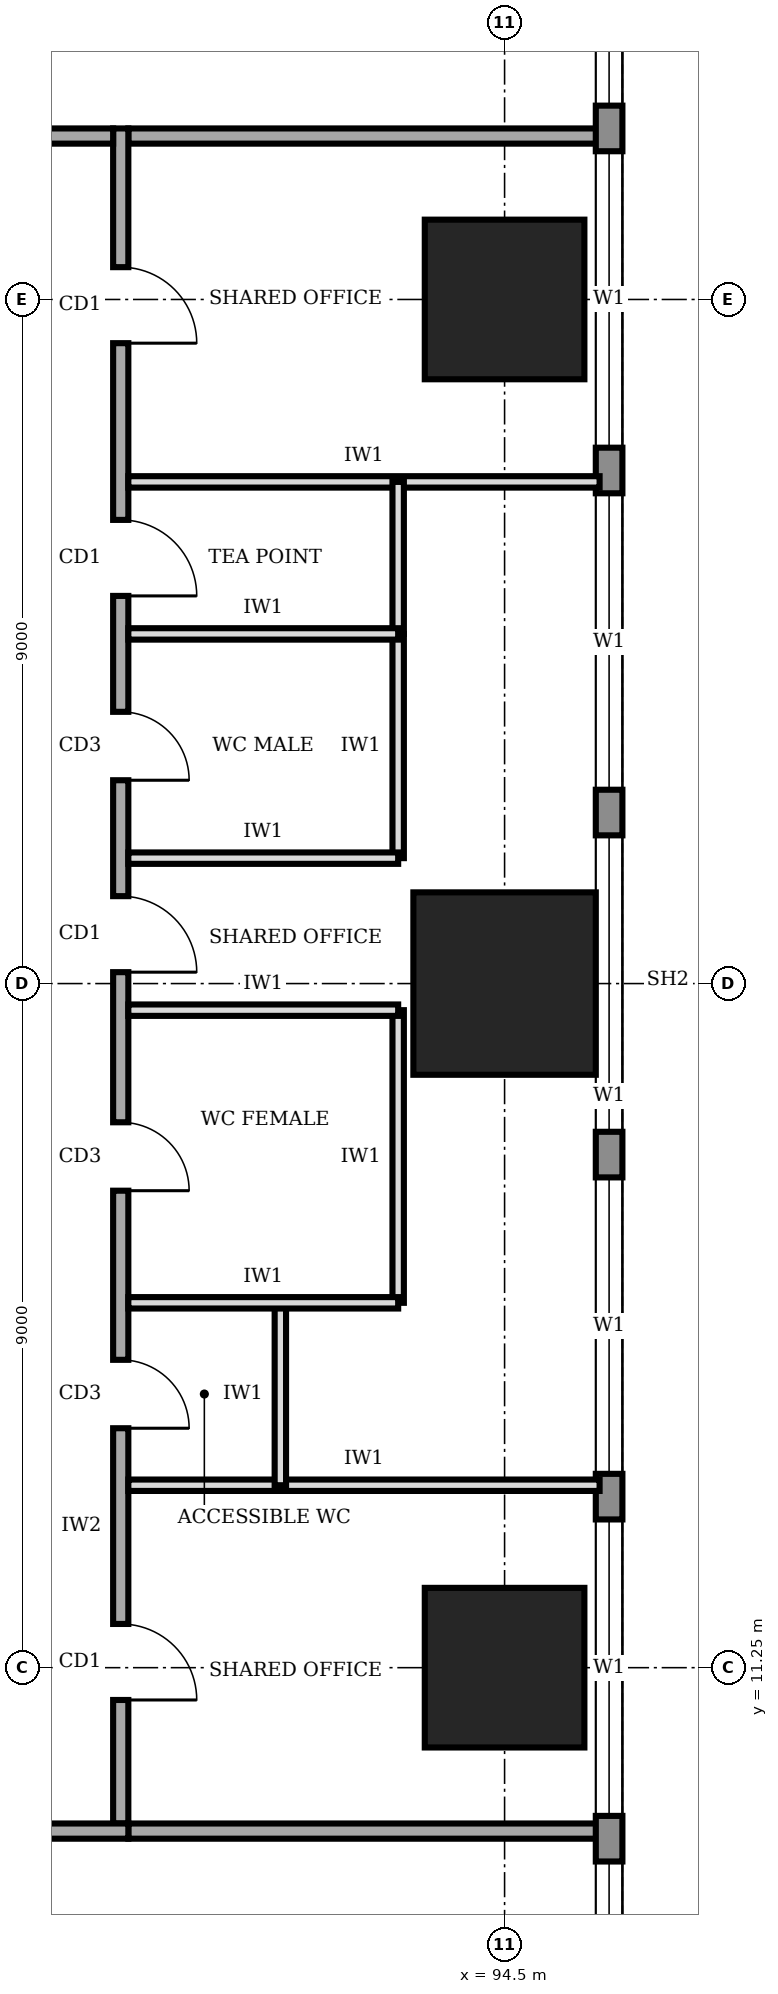
"""IFC4 building model, lengths in metres.
Left out: names, types, materials, properties, quantities, classifications, styles, units other than length and angle.
Written with IfcOpenShell. Run it as: python <this file> out.ifc"""

import sys

from ifc_helpers import new_model, si_unit, direction, frame, frame_2d, origin, origin_2d, place, context, subcontext, project, spatial, rectangle, extrude, element, fill, save


model = new_model("IFC4")
c1 = context("Model", 3, precision=1e-05, world=origin(), true_north=direction((0.0, 1.0)))
c2 = subcontext(c1, "Body", "Model", "MODEL_VIEW")
j1 = project(units=[si_unit("LENGTHUNIT", "METRE"), si_unit("PLANEANGLEUNIT", "RADIAN")], contexts=[c1])
p1 = place(None, origin())
s1 = spatial("IfcSite", under=j1, at=p1, CompositionType="ELEMENT")
p2 = place(p1, origin())
s2 = spatial("IfcBuilding", under=s1, at=p2, CompositionType="ELEMENT")
p3 = place(p2, frame((0.0, 0.0, 133.0)))
s3 = spatial("IfcBuildingStorey", under=s2, at=p3, CompositionType="ELEMENT", Elevation=133.0)
p4 = place(p3, frame((94.5, 11.25, 0.0), z_axis=(0.0, 0.0, 1.0), x_axis=(1.0, 0.0, 0.0)))
e1 = element("IfcColumn", 1, at=p4, inside=s3, PredefinedType="COLUMN", context=c2, shape_type="SweptSolid", body=[
    extrude(rectangle(XDim=2.1, YDim=2.1, at=origin_2d()), origin(), (0.0, 0.0, 1.0), 4.0),
])
p5 = place(p3, frame((94.5, 20.25, 0.0), z_axis=(0.0, 0.0, 1.0), x_axis=(1.0, 0.0, 0.0)))
e2 = element("IfcColumn", 2, at=p5, inside=s3, PredefinedType="COLUMN", context=c2, shape_type="SweptSolid", body=[
    extrude(rectangle(XDim=2.4, YDim=2.4, at=origin_2d()), origin(), (0.0, 0.0, 1.0), 4.0),
])
p6 = place(p3, frame((94.5, 29.25, 0.0), z_axis=(0.0, 0.0, 1.0), x_axis=(1.0, 0.0, 0.0)))
e3 = element("IfcColumn", 3, at=p6, inside=s3, PredefinedType="COLUMN", context=c2, shape_type="SweptSolid", body=[
    extrude(rectangle(XDim=2.1, YDim=2.1, at=origin_2d()), origin(), (0.0, 0.0, 1.0), 4.0),
])
p7 = place(p3, frame((95.875, 3.32, 0.0), z_axis=(0.0, 0.0, 1.0), x_axis=(0.0, 1.0, 0.0)))
e4 = element("IfcWall", 4, at=p7, inside=s3, PredefinedType="STANDARD", context=c2, shape_type="SweptSolid", body=[
    extrude(rectangle(XDim=33.96, YDim=0.35, at=frame_2d((16.98, 0.0))), origin(), (0.0, 0.0, 1.0), 3.75),
])
p8 = place(p7, frame((1.48, 0.0, 0.9)))
e5 = element("IfcOpeningElement", 5, at=p8, cuts=e4, PredefinedType="OPENING", context=c2, shape_type="SweptSolid", body=[
    extrude(rectangle(XDim=3.9, YDim=2.2, at=frame_2d((1.95, 1.1))), frame((0.0, 0.185, 0.0), z_axis=(0.0, -1.0, 0.0), x_axis=(1.0, 0.0, 0.0)), (0.0, 0.0, 1.0), 0.37),
])
p9 = place(p7, frame((5.98, 0.0, 0.9)))
e6 = element("IfcOpeningElement", 6, at=p9, cuts=e4, PredefinedType="OPENING", context=c2, shape_type="SweptSolid", body=[
    extrude(rectangle(XDim=3.9, YDim=2.2, at=frame_2d((1.95, 1.1))), frame((0.0, 0.185, 0.0), z_axis=(0.0, -1.0, 0.0), x_axis=(1.0, 0.0, 0.0)), (0.0, 0.0, 1.0), 0.37),
])
p10 = place(p7, frame((10.48, 0.0, 0.9)))
e7 = element("IfcOpeningElement", 7, at=p10, cuts=e4, PredefinedType="OPENING", context=c2, shape_type="SweptSolid", body=[
    extrude(rectangle(XDim=3.9, YDim=2.2, at=frame_2d((1.95, 1.1))), frame((0.0, 0.185, 0.0), z_axis=(0.0, -1.0, 0.0), x_axis=(1.0, 0.0, 0.0)), (0.0, 0.0, 1.0), 0.37),
])
p11 = place(p7, frame((14.98, 0.0, 0.9)))
e8 = element("IfcOpeningElement", 8, at=p11, cuts=e4, PredefinedType="OPENING", context=c2, shape_type="SweptSolid", body=[
    extrude(rectangle(XDim=3.9, YDim=2.2, at=frame_2d((1.95, 1.1))), frame((0.0, 0.185, 0.0), z_axis=(0.0, -1.0, 0.0), x_axis=(1.0, 0.0, 0.0)), (0.0, 0.0, 1.0), 0.37),
])
p12 = place(p7, frame((19.48, 0.0, 0.9)))
e9 = element("IfcOpeningElement", 9, at=p12, cuts=e4, PredefinedType="OPENING", context=c2, shape_type="SweptSolid", body=[
    extrude(rectangle(XDim=3.9, YDim=2.2, at=frame_2d((1.95, 1.1))), frame((0.0, 0.185, 0.0), z_axis=(0.0, -1.0, 0.0), x_axis=(1.0, 0.0, 0.0)), (0.0, 0.0, 1.0), 0.37),
])
p13 = place(p7, frame((23.98, 0.0, 0.9)))
e10 = element("IfcOpeningElement", 10, at=p13, cuts=e4, PredefinedType="OPENING", context=c2, shape_type="SweptSolid", body=[
    extrude(rectangle(XDim=3.9, YDim=2.2, at=frame_2d((1.95, 1.1))), frame((0.0, 0.185, 0.0), z_axis=(0.0, -1.0, 0.0), x_axis=(1.0, 0.0, 0.0)), (0.0, 0.0, 1.0), 0.37),
])
p14 = place(p7, frame((28.48, 0.0, 0.9)))
e11 = element("IfcOpeningElement", 11, at=p14, cuts=e4, PredefinedType="OPENING", context=c2, shape_type="SweptSolid", body=[
    extrude(rectangle(XDim=3.9, YDim=2.2, at=frame_2d((1.95, 1.1))), frame((0.0, 0.185, 0.0), z_axis=(0.0, -1.0, 0.0), x_axis=(1.0, 0.0, 0.0)), (0.0, 0.0, 1.0), 0.37),
])
p15 = place(p3, frame((72.65, 9.1, 0.0), z_axis=(0.0, 0.0, 1.0), x_axis=(1.0, 0.0, 0.0)))
e12 = element("IfcWall", 12, at=p15, inside=s3, PredefinedType="SOLIDWALL", context=c2, shape_type="SweptSolid", body=[
    extrude(rectangle(XDim=16.9, YDim=0.2, at=frame_2d((8.45, 0.0))), origin(), (0.0, 0.0, 1.0), 3.75),
])
p16 = place(p15, frame((1.325, 0.0, 0.0)))
e13 = element("IfcOpeningElement", 13, at=p16, cuts=e12, PredefinedType="OPENING", context=c2, shape_type="SweptSolid", body=[
    extrude(rectangle(XDim=1.0, YDim=2.1, at=frame_2d((0.5, 1.05))), frame((0.0, 0.11, 0.0), z_axis=(0.0, -1.0, 0.0), x_axis=(1.0, 0.0, 0.0)), (0.0, 0.0, 1.0), 0.22),
])
p17 = place(p15, frame((5.6, 0.0, 0.0)))
e14 = element("IfcOpeningElement", 14, at=p17, cuts=e12, PredefinedType="OPENING", context=c2, shape_type="SweptSolid", body=[
    extrude(rectangle(XDim=1.0, YDim=2.1, at=frame_2d((0.5, 1.05))), frame((0.0, 0.11, 0.0), z_axis=(0.0, -1.0, 0.0), x_axis=(1.0, 0.0, 0.0)), (0.0, 0.0, 1.0), 0.22),
])
p18 = place(p15, frame((12.125, 0.0, 0.0)))
e15 = element("IfcOpeningElement", 15, at=p18, cuts=e12, PredefinedType="OPENING", context=c2, shape_type="SweptSolid", body=[
    extrude(rectangle(XDim=1.0, YDim=2.1, at=frame_2d((0.5, 1.05))), frame((0.0, 0.11, 0.0), z_axis=(0.0, -1.0, 0.0), x_axis=(1.0, 0.0, 0.0)), (0.0, 0.0, 1.0), 0.22),
])
p19 = place(p3, frame((89.45, 9.2, 0.0), z_axis=(0.0, 0.0, 1.0), x_axis=(0.0, 1.0, 0.0)))
e16 = element("IfcWall", 16, at=p19, inside=s3, PredefinedType="SOLIDWALL", context=c2, shape_type="SweptSolid", body=[
    extrude(rectangle(XDim=22.3, YDim=0.2, at=frame_2d((11.15, 0.0))), origin(), (0.0, 0.0, 1.0), 3.75),
])
p20 = place(p19, frame((1.625, 0.0, 0.0)))
e17 = element("IfcOpeningElement", 17, at=p20, cuts=e16, PredefinedType="OPENING", context=c2, shape_type="SweptSolid", body=[
    extrude(rectangle(XDim=1.0, YDim=2.1, at=frame_2d((0.5, 1.05))), frame((0.0, 0.11, 0.0), z_axis=(0.0, -1.0, 0.0), x_axis=(1.0, 0.0, 0.0)), (0.0, 0.0, 1.0), 0.22),
])
p21 = place(p19, frame((5.2, 0.0, 0.0)))
e18 = element("IfcOpeningElement", 18, at=p21, cuts=e16, PredefinedType="OPENING", context=c2, shape_type="SweptSolid", body=[
    extrude(rectangle(XDim=0.9, YDim=2.1, at=frame_2d((0.45, 1.05))), frame((0.0, 0.11, 0.0), z_axis=(0.0, -1.0, 0.0), x_axis=(1.0, 0.0, 0.0)), (0.0, 0.0, 1.0), 0.22),
])
p22 = place(p19, frame((8.325, 0.0, 0.0)))
e19 = element("IfcOpeningElement", 19, at=p22, cuts=e16, PredefinedType="OPENING", context=c2, shape_type="SweptSolid", body=[
    extrude(rectangle(XDim=0.9, YDim=2.1, at=frame_2d((0.45, 1.05))), frame((0.0, 0.11, 0.0), z_axis=(0.0, -1.0, 0.0), x_axis=(1.0, 0.0, 0.0)), (0.0, 0.0, 1.0), 0.22),
])
p23 = place(p19, frame((13.725, 0.0, 0.0)))
e20 = element("IfcOpeningElement", 20, at=p23, cuts=e16, PredefinedType="OPENING", context=c2, shape_type="SweptSolid", body=[
    extrude(rectangle(XDim=0.9, YDim=2.1, at=frame_2d((0.45, 1.05))), frame((0.0, 0.11, 0.0), z_axis=(0.0, -1.0, 0.0), x_axis=(1.0, 0.0, 0.0)), (0.0, 0.0, 1.0), 0.22),
])
p24 = place(p19, frame((16.15, 0.0, 0.0)))
e21 = element("IfcOpeningElement", 21, at=p24, cuts=e16, PredefinedType="OPENING", context=c2, shape_type="SweptSolid", body=[
    extrude(rectangle(XDim=1.0, YDim=2.1, at=frame_2d((0.5, 1.05))), frame((0.0, 0.11, 0.0), z_axis=(0.0, -1.0, 0.0), x_axis=(1.0, 0.0, 0.0)), (0.0, 0.0, 1.0), 0.22),
])
p25 = place(p19, frame((11.2, 0.0, 0.0)))
e22 = element("IfcOpeningElement", 22, at=p25, cuts=e16, PredefinedType="OPENING", context=c2, shape_type="SweptSolid", body=[
    extrude(rectangle(XDim=1.0, YDim=2.1, at=frame_2d((0.5, 1.05))), frame((0.0, 0.11, 0.0), z_axis=(0.0, -1.0, 0.0), x_axis=(1.0, 0.0, 0.0)), (0.0, 0.0, 1.0), 0.22),
])
p26 = place(p19, frame((19.475, 0.0, 0.0)))
e23 = element("IfcOpeningElement", 23, at=p26, cuts=e16, PredefinedType="OPENING", context=c2, shape_type="SweptSolid", body=[
    extrude(rectangle(XDim=1.0, YDim=2.1, at=frame_2d((0.5, 1.05))), frame((0.0, 0.11, 0.0), z_axis=(0.0, -1.0, 0.0), x_axis=(1.0, 0.0, 0.0)), (0.0, 0.0, 1.0), 0.22),
])
p27 = place(p3, frame((89.35, 31.4, 0.0), z_axis=(0.0, 0.0, 1.0), x_axis=(-1.0, 0.0, 0.0)))
e24 = element("IfcWall", 24, at=p27, inside=s3, PredefinedType="SOLIDWALL", context=c2, shape_type="SweptSolid", body=[
    extrude(rectangle(XDim=16.9, YDim=0.2, at=frame_2d((8.45, 0.0))), origin(), (0.0, 0.0, 1.0), 3.75),
])
p28 = place(p27, frame((13.975, 0.0, 0.0)))
e25 = element("IfcOpeningElement", 25, at=p28, cuts=e24, PredefinedType="OPENING", context=c2, shape_type="SweptSolid", body=[
    extrude(rectangle(XDim=1.8, YDim=2.1, at=frame_2d((0.9, 1.05))), frame((0.0, 0.11, 0.0), z_axis=(0.0, -1.0, 0.0), x_axis=(1.0, 0.0, 0.0)), (0.0, 0.0, 1.0), 0.22),
])
p29 = place(p27, frame((7.85, 0.0, 0.0)))
e26 = element("IfcOpeningElement", 26, at=p29, cuts=e24, PredefinedType="OPENING", context=c2, shape_type="SweptSolid", body=[
    extrude(rectangle(XDim=1.0, YDim=2.1, at=frame_2d((0.5, 1.05))), frame((0.0, 0.11, 0.0), z_axis=(0.0, -1.0, 0.0), x_axis=(1.0, 0.0, 0.0)), (0.0, 0.0, 1.0), 0.22),
])
p30 = place(p27, frame((1.325, 0.0, 0.0)))
e27 = element("IfcOpeningElement", 27, at=p30, cuts=e24, PredefinedType="OPENING", context=c2, shape_type="SweptSolid", body=[
    extrude(rectangle(XDim=1.0, YDim=2.1, at=frame_2d((0.5, 1.05))), frame((0.0, 0.11, 0.0), z_axis=(0.0, -1.0, 0.0), x_axis=(1.0, 0.0, 0.0)), (0.0, 0.0, 1.0), 0.22),
])
for number, where, z_axis, x_axis in (
    (28, (89.55, 9.1, 0.0), (0.0, 0.0, 1.0), (1.0, 0.0, 0.0)),
    (29, (89.55, 31.4, 0.0), (0.0, 0.0, 1.0), (1.0, 0.0, 0.0)),
):
    element("IfcWall", number, at=place(p3, frame(where, z_axis=z_axis, x_axis=x_axis)), inside=s3, PredefinedType="SOLIDWALL", context=c2, shape_type="SweptSolid", body=[
        extrude(rectangle(XDim=6.2, YDim=0.2, at=frame_2d((3.1, 0.0))), origin(), (0.0, 0.0, 1.0), 3.75),
    ])
for number, where, z_axis, x_axis in (
    (30, (89.55, 13.65, 0.0), (0.0, 0.0, 1.0), (1.0, 0.0, 0.0)),
    (31, (89.55, 26.85, 0.0), (0.0, 0.0, 1.0), (1.0, 0.0, 0.0)),
):
    element("IfcWall", number, at=place(p3, frame(where, z_axis=z_axis, x_axis=x_axis)), inside=s3, PredefinedType="PARTITIONING", context=c2, shape_type="SweptSolid", body=[
        extrude(rectangle(XDim=6.2, YDim=0.15, at=frame_2d((3.1, 0.0))), origin(), (0.0, 0.0, 1.0), 3.75),
    ])
p31 = place(p3, frame((89.55, 16.05, 0.0), z_axis=(0.0, 0.0, 1.0), x_axis=(1.0, 0.0, 0.0)))
e32 = element("IfcWall", 32, at=p31, inside=s3, PredefinedType="PARTITIONING", context=c2, shape_type="SweptSolid", body=[
    extrude(rectangle(XDim=3.55, YDim=0.15, at=frame_2d((1.775, 0.0))), origin(), (0.0, 0.0, 1.0), 3.75),
])
p32 = place(p3, frame((89.55, 19.9, 0.0), z_axis=(0.0, 0.0, 1.0), x_axis=(1.0, 0.0, 0.0)))
e33 = element("IfcWall", 33, at=p32, inside=s3, PredefinedType="PARTITIONING", context=c2, shape_type="SweptSolid", body=[
    extrude(rectangle(XDim=3.55, YDim=0.15, at=frame_2d((1.775, 0.0))), origin(), (0.0, 0.0, 1.0), 2.85),
])
for number, where, z_axis, x_axis in (
    (34, (89.55, 21.9, 0.0), (0.0, 0.0, 1.0), (1.0, 0.0, 0.0)),
    (35, (89.55, 24.85, 0.0), (0.0, 0.0, 1.0), (1.0, 0.0, 0.0)),
):
    element("IfcWall", number, at=place(p3, frame(where, z_axis=z_axis, x_axis=x_axis)), inside=s3, PredefinedType="PARTITIONING", context=c2, shape_type="SweptSolid", body=[
        extrude(rectangle(XDim=3.55, YDim=0.15, at=frame_2d((1.775, 0.0))), origin(), (0.0, 0.0, 1.0), 3.75),
    ])
p33 = place(p3, frame((91.55, 13.65, 0.0), z_axis=(0.0, 0.0, 1.0), x_axis=(0.0, 1.0, 0.0)))
e36 = element("IfcWall", 36, at=p33, inside=s3, PredefinedType="PARTITIONING", context=c2, shape_type="SweptSolid", body=[
    extrude(rectangle(XDim=2.4, YDim=0.15, at=frame_2d((1.2, 0.0))), origin(), (0.0, 0.0, 1.0), 3.75),
])
p34 = place(p3, frame((93.1, 16.05, 0.0), z_axis=(0.0, 0.0, 1.0), x_axis=(0.0, 1.0, 0.0)))
e37 = element("IfcWall", 37, at=p34, inside=s3, PredefinedType="PARTITIONING", context=c2, shape_type="SweptSolid", body=[
    extrude(rectangle(XDim=3.85, YDim=0.15, at=frame_2d((1.925, 0.0))), origin(), (0.0, 0.0, 1.0), 3.75),
])
p35 = place(p3, frame((93.1, 21.9, 0.0), z_axis=(0.0, 0.0, 1.0), x_axis=(0.0, 1.0, 0.0)))
e38 = element("IfcWall", 38, at=p35, inside=s3, PredefinedType="PARTITIONING", context=c2, shape_type="SweptSolid", body=[
    extrude(rectangle(XDim=2.95, YDim=0.15, at=frame_2d((1.475, 0.0))), origin(), (0.0, 0.0, 1.0), 3.75),
])
p36 = place(p3, frame((93.1, 24.85, 0.0), z_axis=(0.0, 0.0, 1.0), x_axis=(0.0, 1.0, 0.0)))
e39 = element("IfcWall", 39, at=p36, inside=s3, PredefinedType="PARTITIONING", context=c2, shape_type="SweptSolid", body=[
    extrude(rectangle(XDim=2.0, YDim=0.15, at=frame_2d((1.0, 0.0))), origin(), (0.0, 0.0, 1.0), 3.75),
])
p37 = place(p8, origin())
e40 = element("IfcWindow", 40, at=p37, inside=s3, PartitioningType="SINGLE_PANEL", PredefinedType="WINDOW", context=c2, shape_type="SweptSolid", body=[
    extrude(rectangle(XDim=3.9, YDim=2.2, at=frame_2d((1.95, 1.1))), frame((0.0, 0.03, 0.0), z_axis=(0.0, -1.0, 0.0), x_axis=(1.0, 0.0, 0.0)), (0.0, 0.0, 1.0), 0.06),
])
fill(e5, e40)
p38 = place(p9, origin())
e41 = element("IfcWindow", 41, at=p38, inside=s3, PartitioningType="SINGLE_PANEL", PredefinedType="WINDOW", context=c2, shape_type="SweptSolid", body=[
    extrude(rectangle(XDim=3.9, YDim=2.2, at=frame_2d((1.95, 1.1))), frame((0.0, 0.03, 0.0), z_axis=(0.0, -1.0, 0.0), x_axis=(1.0, 0.0, 0.0)), (0.0, 0.0, 1.0), 0.06),
])
fill(e6, e41)
p39 = place(p10, origin())
e42 = element("IfcWindow", 42, at=p39, inside=s3, PartitioningType="SINGLE_PANEL", PredefinedType="WINDOW", context=c2, shape_type="SweptSolid", body=[
    extrude(rectangle(XDim=3.9, YDim=2.2, at=frame_2d((1.95, 1.1))), frame((0.0, 0.03, 0.0), z_axis=(0.0, -1.0, 0.0), x_axis=(1.0, 0.0, 0.0)), (0.0, 0.0, 1.0), 0.06),
])
fill(e7, e42)
p40 = place(p11, origin())
e43 = element("IfcWindow", 43, at=p40, inside=s3, PartitioningType="SINGLE_PANEL", PredefinedType="WINDOW", context=c2, shape_type="SweptSolid", body=[
    extrude(rectangle(XDim=3.9, YDim=2.2, at=frame_2d((1.95, 1.1))), frame((0.0, 0.03, 0.0), z_axis=(0.0, -1.0, 0.0), x_axis=(1.0, 0.0, 0.0)), (0.0, 0.0, 1.0), 0.06),
])
fill(e8, e43)
p41 = place(p12, origin())
e44 = element("IfcWindow", 44, at=p41, inside=s3, PartitioningType="SINGLE_PANEL", PredefinedType="WINDOW", context=c2, shape_type="SweptSolid", body=[
    extrude(rectangle(XDim=3.9, YDim=2.2, at=frame_2d((1.95, 1.1))), frame((0.0, 0.03, 0.0), z_axis=(0.0, -1.0, 0.0), x_axis=(1.0, 0.0, 0.0)), (0.0, 0.0, 1.0), 0.06),
])
fill(e9, e44)
p42 = place(p13, origin())
e45 = element("IfcWindow", 45, at=p42, inside=s3, PartitioningType="SINGLE_PANEL", PredefinedType="WINDOW", context=c2, shape_type="SweptSolid", body=[
    extrude(rectangle(XDim=3.9, YDim=2.2, at=frame_2d((1.95, 1.1))), frame((0.0, 0.03, 0.0), z_axis=(0.0, -1.0, 0.0), x_axis=(1.0, 0.0, 0.0)), (0.0, 0.0, 1.0), 0.06),
])
fill(e10, e45)
p43 = place(p14, origin())
e46 = element("IfcWindow", 46, at=p43, inside=s3, PartitioningType="SINGLE_PANEL", PredefinedType="WINDOW", context=c2, shape_type="SweptSolid", body=[
    extrude(rectangle(XDim=3.9, YDim=2.2, at=frame_2d((1.95, 1.1))), frame((0.0, 0.03, 0.0), z_axis=(0.0, -1.0, 0.0), x_axis=(1.0, 0.0, 0.0)), (0.0, 0.0, 1.0), 0.06),
])
fill(e11, e46)
p44 = place(p20, frame((1.0, 0.0, 0.0), z_axis=(0.0, 0.0, 1.0), x_axis=(-1.0, 0.0, 0.0)))
e47 = element("IfcDoor", 47, at=p44, inside=s3, OperationType="SINGLE_SWING_RIGHT", PredefinedType="DOOR", context=c2, shape_type="SweptSolid", body=[
    extrude(rectangle(XDim=1.0, YDim=2.1, at=frame_2d((0.5, 1.05))), frame((0.0, 0.025, 0.0), z_axis=(0.0, -1.0, 0.0), x_axis=(1.0, 0.0, 0.0)), (0.0, 0.0, 1.0), 0.05),
])
fill(e17, e47)
p45 = place(p21, frame((0.9, 0.0, 0.0), z_axis=(0.0, 0.0, 1.0), x_axis=(-1.0, 0.0, 0.0)))
e48 = element("IfcDoor", 48, at=p45, inside=s3, OperationType="SINGLE_SWING_RIGHT", PredefinedType="DOOR", context=c2, shape_type="SweptSolid", body=[
    extrude(rectangle(XDim=0.9, YDim=2.1, at=frame_2d((0.45, 1.05))), frame((0.0, 0.025, 0.0), z_axis=(0.0, -1.0, 0.0), x_axis=(1.0, 0.0, 0.0)), (0.0, 0.0, 1.0), 0.05),
])
fill(e18, e48)
p46 = place(p22, frame((0.9, 0.0, 0.0), z_axis=(0.0, 0.0, 1.0), x_axis=(-1.0, 0.0, 0.0)))
e49 = element("IfcDoor", 49, at=p46, inside=s3, OperationType="SINGLE_SWING_RIGHT", PredefinedType="DOOR", context=c2, shape_type="SweptSolid", body=[
    extrude(rectangle(XDim=0.9, YDim=2.1, at=frame_2d((0.45, 1.05))), frame((0.0, 0.025, 0.0), z_axis=(0.0, -1.0, 0.0), x_axis=(1.0, 0.0, 0.0)), (0.0, 0.0, 1.0), 0.05),
])
fill(e19, e49)
p47 = place(p23, frame((0.9, 0.0, 0.0), z_axis=(0.0, 0.0, 1.0), x_axis=(-1.0, 0.0, 0.0)))
e50 = element("IfcDoor", 50, at=p47, inside=s3, OperationType="SINGLE_SWING_RIGHT", PredefinedType="DOOR", context=c2, shape_type="SweptSolid", body=[
    extrude(rectangle(XDim=0.9, YDim=2.1, at=frame_2d((0.45, 1.05))), frame((0.0, 0.025, 0.0), z_axis=(0.0, -1.0, 0.0), x_axis=(1.0, 0.0, 0.0)), (0.0, 0.0, 1.0), 0.05),
])
fill(e20, e50)
p48 = place(p24, frame((1.0, 0.0, 0.0), z_axis=(0.0, 0.0, 1.0), x_axis=(-1.0, 0.0, 0.0)))
e51 = element("IfcDoor", 51, at=p48, inside=s3, OperationType="SINGLE_SWING_RIGHT", PredefinedType="DOOR", context=c2, shape_type="SweptSolid", body=[
    extrude(rectangle(XDim=1.0, YDim=2.1, at=frame_2d((0.5, 1.05))), frame((0.0, 0.025, 0.0), z_axis=(0.0, -1.0, 0.0), x_axis=(1.0, 0.0, 0.0)), (0.0, 0.0, 1.0), 0.05),
])
fill(e21, e51)
p49 = place(p25, frame((1.0, 0.0, 0.0), z_axis=(0.0, 0.0, 1.0), x_axis=(-1.0, 0.0, 0.0)))
e52 = element("IfcDoor", 52, at=p49, inside=s3, OperationType="SINGLE_SWING_RIGHT", PredefinedType="DOOR", context=c2, shape_type="SweptSolid", body=[
    extrude(rectangle(XDim=1.0, YDim=2.1, at=frame_2d((0.5, 1.05))), frame((0.0, 0.025, 0.0), z_axis=(0.0, -1.0, 0.0), x_axis=(1.0, 0.0, 0.0)), (0.0, 0.0, 1.0), 0.05),
])
fill(e22, e52)
p50 = place(p26, frame((1.0, 0.0, 0.0), z_axis=(0.0, 0.0, 1.0), x_axis=(-1.0, 0.0, 0.0)))
e53 = element("IfcDoor", 53, at=p50, inside=s3, OperationType="SINGLE_SWING_RIGHT", PredefinedType="DOOR", context=c2, shape_type="SweptSolid", body=[
    extrude(rectangle(XDim=1.0, YDim=2.1, at=frame_2d((0.5, 1.05))), frame((0.0, 0.025, 0.0), z_axis=(0.0, -1.0, 0.0), x_axis=(1.0, 0.0, 0.0)), (0.0, 0.0, 1.0), 0.05),
])
fill(e23, e53)
save(model, sys.argv[1])
